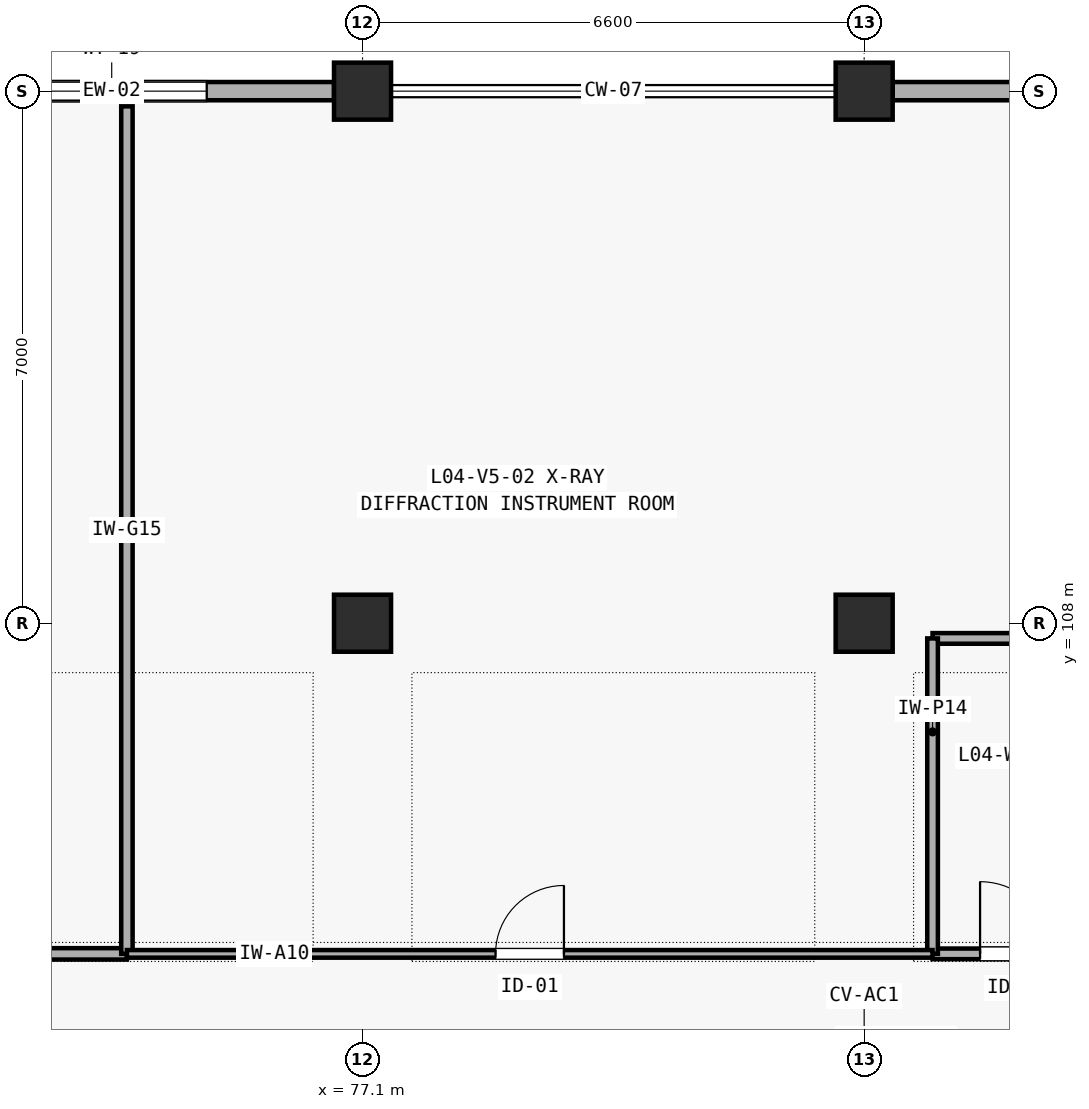
"""IFC4 building model, lengths in metres.
Left out: names, types, materials, properties, quantities, classifications, styles, units other than length and angle.
Written with IfcOpenShell. Run it as: python <this file> out.ifc"""

import sys

from ifc_helpers import new_model, si_unit, direction, frame, frame_2d, origin, origin_2d, place, context, subcontext, project, spatial, rectangle, extrude, element, fill, save


model = new_model("IFC4")
c1 = context("Model", 3, precision=1e-05, world=origin(), true_north=direction((0.0, 1.0)))
c2 = subcontext(c1, "Body", "Model", "MODEL_VIEW")
j1 = project(units=[si_unit("LENGTHUNIT", "METRE"), si_unit("PLANEANGLEUNIT", "RADIAN")], contexts=[c1])
p1 = place(None, origin())
s1 = spatial("IfcSite", under=j1, at=p1, CompositionType="ELEMENT")
p2 = place(p1, origin())
s2 = spatial("IfcBuilding", under=s1, at=p2, CompositionType="ELEMENT")
p3 = place(p2, frame((0.0, 0.0, 16.8)))
s3 = spatial("IfcBuildingStorey", under=s2, at=p3, CompositionType="ELEMENT", Elevation=16.8)
for number, where, z_axis, x_axis in (
    (1, (77.1, 108.0, 0.0), (0.0, 0.0, 1.0), (1.0, 0.0, 0.0)),
    (2, (77.1, 115.0, 0.0), (0.0, 0.0, 1.0), (1.0, 0.0, 0.0)),
    (3, (83.7, 108.0, 0.0), (0.0, 0.0, 1.0), (1.0, 0.0, 0.0)),
    (4, (83.7, 115.0, 0.0), (0.0, 0.0, 1.0), (1.0, 0.0, 0.0)),
):
    element("IfcColumn", number, at=place(p3, frame(where, z_axis=z_axis, x_axis=x_axis)), inside=s3, PredefinedType="COLUMN", context=c2, shape_type="SweptSolid", body=[
        extrude(rectangle(XDim=0.75, YDim=0.75, at=origin_2d()), origin(), (0.0, 0.0, 1.0), 4.2),
    ])
p4 = place(p3, frame((70.875, 115.0, 0.0), z_axis=(0.0, 0.0, 1.0), x_axis=(1.0, 0.0, 0.0)))
e5 = element("IfcWall", 5, at=p4, inside=s3, PredefinedType="SOLIDWALL", context=c2, shape_type="SweptSolid", body=[
    extrude(rectangle(XDim=5.85, YDim=0.24, at=frame_2d((2.925, 0.0))), origin(), (0.0, 0.0, 1.0), 3.365),
])
p5 = place(p4, frame((1.675, 0.0, 0.85)))
e6 = element("IfcOpeningElement", 6, at=p5, cuts=e5, PredefinedType="OPENING", context=c2, shape_type="SweptSolid", body=[
    extrude(rectangle(XDim=2.5, YDim=1.25, at=frame_2d((1.25, 0.625))), frame((0.0, 0.13, 0.0), z_axis=(0.0, -1.0, 0.0), x_axis=(1.0, 0.0, 0.0)), (0.0, 0.0, 1.0), 0.26),
])
p6 = place(p3, frame((84.075, 115.0, 0.0), z_axis=(0.0, 0.0, 1.0), x_axis=(1.0, 0.0, 0.0)))
e7 = element("IfcWall", 7, at=p6, inside=s3, PredefinedType="SOLIDWALL", context=c2, shape_type="SweptSolid", body=[
    extrude(rectangle(XDim=5.85, YDim=0.24, at=frame_2d((2.925, 0.0))), origin(), (0.0, 0.0, 1.0), 3.345),
])
p7 = place(p6, frame((1.875, 0.0, 0.85)))
e8 = element("IfcOpeningElement", 8, at=p7, cuts=e7, PredefinedType="OPENING", context=c2, shape_type="SweptSolid", body=[
    extrude(rectangle(XDim=2.1, YDim=1.6, at=frame_2d((1.05, 0.8))), frame((0.0, 0.13, 0.0), z_axis=(0.0, -1.0, 0.0), x_axis=(1.0, 0.0, 0.0)), (0.0, 0.0, 1.0), 0.26),
])
p8 = place(p3, frame((84.6, 103.65, 0.0), z_axis=(0.0, 0.0, 1.0), x_axis=(1.0, 0.0, 0.0)))
e9 = element("IfcWall", 9, at=p8, inside=s3, PredefinedType="PLUMBINGWALL", context=c2, shape_type="SweptSolid", body=[
    extrude(rectangle(XDim=2.2, YDim=0.14, at=frame_2d((1.1, 0.0))), origin(), (0.0, 0.0, 1.0), 3.9),
])
p9 = place(p8, frame((0.625, 0.0, 0.0)))
e10 = element("IfcOpeningElement", 10, at=p9, cuts=e9, PredefinedType="OPENING", context=c2, shape_type="SweptSolid", body=[
    extrude(rectangle(XDim=0.95, YDim=2.1, at=frame_2d((0.475, 1.05))), frame((0.0, 0.08, 0.0), z_axis=(0.0, -1.0, 0.0), x_axis=(1.0, 0.0, 0.0)), (0.0, 0.0, 1.0), 0.16),
])
p10 = place(p3, frame((84.6, 107.8, 0.0), z_axis=(0.0, 0.0, 1.0), x_axis=(1.0, 0.0, 0.0)))
e11 = element("IfcWall", 11, at=p10, inside=s3, PredefinedType="PLUMBINGWALL", context=c2, shape_type="SweptSolid", body=[
    extrude(rectangle(XDim=2.2, YDim=0.14, at=frame_2d((1.1, 0.0))), origin(), (0.0, 0.0, 1.0), 3.345),
])
p11 = place(p3, frame((84.6, 103.65, 0.0), z_axis=(0.0, 0.0, 1.0), x_axis=(0.0, 1.0, 0.0)))
e12 = element("IfcWall", 12, at=p11, inside=s3, PredefinedType="PLUMBINGWALL", context=c2, shape_type="SweptSolid", body=[
    extrude(rectangle(XDim=4.15, YDim=0.14, at=frame_2d((2.075, 0.0))), origin(), (0.0, 0.0, 1.0), 3.9),
])
p12 = place(p3, frame((57.5, 103.65, 0.0), z_axis=(0.0, 0.0, 1.0), x_axis=(1.0, 0.0, 0.0)))
e13 = element("IfcWall", 13, at=p12, inside=s3, PredefinedType="PARTITIONING", context=c2, shape_type="SweptSolid", body=[
    extrude(rectangle(XDim=16.5, YDim=0.15, at=frame_2d((8.25, 0.0))), origin(), (0.0, 0.0, 1.0), 3.9),
])
p13 = place(p12, frame((7.4, 0.0, 0.0)))
e14 = element("IfcOpeningElement", 14, at=p13, cuts=e13, PredefinedType="OPENING", context=c2, shape_type="SweptSolid", body=[
    extrude(rectangle(XDim=1.7, YDim=2.2, at=frame_2d((0.85, 1.1))), frame((0.0, 0.085, 0.0), z_axis=(0.0, -1.0, 0.0), x_axis=(1.0, 0.0, 0.0)), (0.0, 0.0, 1.0), 0.17),
])
p14 = place(p3, frame((74.0, 103.65, 0.0), z_axis=(0.0, 0.0, 1.0), x_axis=(0.0, 1.0, 0.0)))
e15 = element("IfcWall", 15, at=p14, inside=s3, PredefinedType="PARTITIONING", context=c2, shape_type="SweptSolid", body=[
    extrude(rectangle(XDim=11.15, YDim=0.15, at=frame_2d((5.575, 0.0))), origin(), (0.0, 0.0, 1.0), 3.9),
])
p15 = place(p3, frame((74.0, 103.65, 0.0), z_axis=(0.0, 0.0, 1.0), x_axis=(1.0, 0.0, 0.0)))
e16 = element("IfcWall", 16, at=p15, inside=s3, PredefinedType="PARTITIONING", context=c2, shape_type="SweptSolid", body=[
    extrude(rectangle(XDim=10.6, YDim=0.1, at=frame_2d((5.3, 0.0))), origin(), (0.0, 0.0, 1.0), 3.9),
])
p16 = place(p15, frame((4.85, 0.0, 0.0)))
e17 = element("IfcOpeningElement", 17, at=p16, cuts=e16, PredefinedType="OPENING", context=c2, shape_type="SweptSolid", body=[
    extrude(rectangle(XDim=0.9, YDim=2.1, at=frame_2d((0.45, 1.05))), frame((0.0, 0.06, 0.0), z_axis=(0.0, -1.0, 0.0), x_axis=(1.0, 0.0, 0.0)), (0.0, 0.0, 1.0), 0.12),
])
p17 = place(p5, origin())
e18 = element("IfcWindow", 18, at=p17, inside=s3, PartitioningType="SINGLE_PANEL", PredefinedType="WINDOW", context=c2, shape_type="SweptSolid", body=[
    extrude(rectangle(XDim=2.5, YDim=1.25, at=frame_2d((1.25, 0.625))), frame((0.0, 0.03, 0.0), z_axis=(0.0, -1.0, 0.0), x_axis=(1.0, 0.0, 0.0)), (0.0, 0.0, 1.0), 0.06),
])
fill(e6, e18)
p18 = place(p9, origin())
e19 = element("IfcDoor", 19, at=p18, inside=s3, OperationType="SINGLE_SWING_LEFT", PredefinedType="DOOR", context=c2, shape_type="SweptSolid", body=[
    extrude(rectangle(XDim=0.95, YDim=2.1, at=frame_2d((0.475, 1.05))), frame((0.0, 0.025, 0.0), z_axis=(0.0, -1.0, 0.0), x_axis=(1.0, 0.0, 0.0)), (0.0, 0.0, 1.0), 0.05),
])
fill(e10, e19)
p19 = place(p16, origin())
e20 = element("IfcDoor", 20, at=p19, inside=s3, OperationType="SINGLE_SWING_RIGHT", PredefinedType="DOOR", context=c2, shape_type="SweptSolid", body=[
    extrude(rectangle(XDim=0.9, YDim=2.1, at=frame_2d((0.45, 1.05))), frame((0.0, 0.025, 0.0), z_axis=(0.0, -1.0, 0.0), x_axis=(1.0, 0.0, 0.0)), (0.0, 0.0, 1.0), 0.05),
])
fill(e17, e20)
save(model, sys.argv[1])
